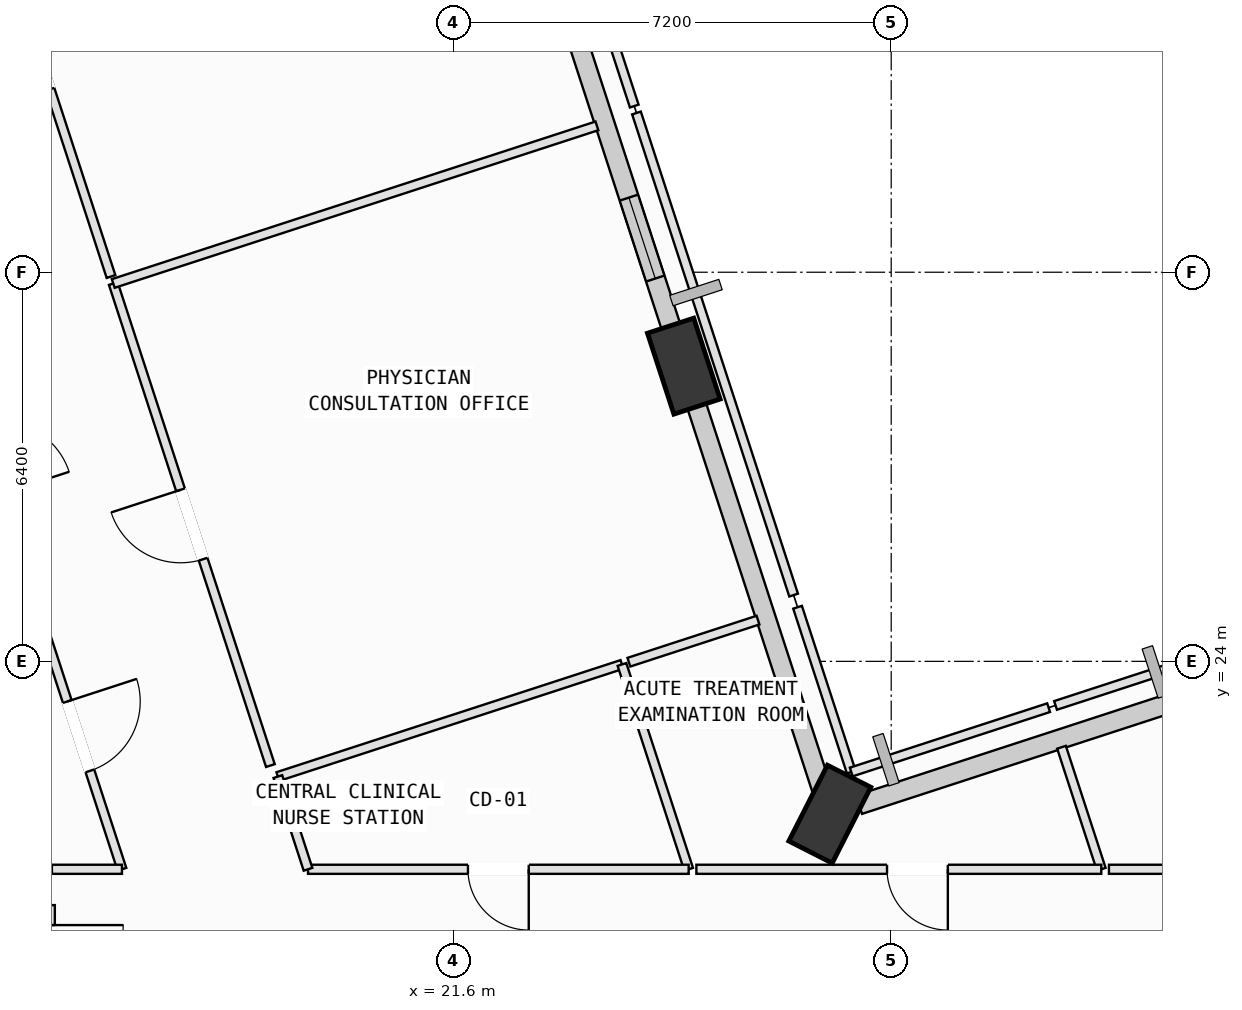
"""IFC4 building model, lengths in metres.
Left out: names, types, materials, properties, quantities, classifications, styles, units other than length and angle.
Written with IfcOpenShell. Run it as: python <this file> out.ifc"""

import sys

from ifc_helpers import new_model, si_unit, direction, frame, frame_2d, origin, origin_2d, place, context, subcontext, project, spatial, rectangle, extrude, element, fill, save


model = new_model("IFC4")
c1 = context("Model", 3, precision=1e-05, world=origin(), true_north=direction((0.0, 1.0)))
c2 = subcontext(c1, "Body", "Model", "MODEL_VIEW")
j1 = project(units=[si_unit("LENGTHUNIT", "METRE"), si_unit("PLANEANGLEUNIT", "RADIAN")], contexts=[c1])
p1 = place(None, origin())
s1 = spatial("IfcSite", under=j1, at=p1, CompositionType="ELEMENT")
p2 = place(p1, origin())
s2 = spatial("IfcBuilding", under=s1, at=p2, CompositionType="ELEMENT")
p3 = place(p2, frame((0.0, 0.0, 100.4)))
s3 = spatial("IfcBuildingStorey", under=s2, at=p3, CompositionType="ELEMENT", Elevation=100.4)
p4 = place(p3, frame((27.791, 21.487, 0.002), z_axis=(0.013923425681, -0.023938521346, 0.999616469159), x_axis=(-0.056236528656, 0.998112250156, 0.0246858043)))
e1 = element("IfcColumn", 1, at=p4, inside=s3, PredefinedType="COLUMN", context=c2, shape_type="SweptSolid", body=[
    extrude(rectangle(XDim=1.4, YDim=0.8, at=origin_2d()), origin(), (0.0, 0.0, 1.0), 3.998),
])
p5 = place(p3, frame((25.389, 28.855, 0.002), z_axis=(-0.016543774751, -0.034125350869, 0.999280623221), x_axis=(0.135656548202, 0.99009956207, 0.036057705404)))
e2 = element("IfcColumn", 2, at=p5, inside=s3, PredefinedType="COLUMN", context=c2, shape_type="SweptSolid", body=[
    extrude(rectangle(XDim=1.4, YDim=0.8, at=origin_2d()), origin(), (0.0, 0.0, 1.0), 3.999),
])
p6 = place(p3, frame((28.271, 21.643, 0.0), z_axis=(0.0, 0.0, 1.0), x_axis=(0.950787828702, 0.309842709763, 0.0)))
e3 = element("IfcWall", 3, at=p6, inside=s3, PredefinedType="SOLIDWALL", context=c2, shape_type="SweptSolid", body=[
    extrude(rectangle(XDim=5.96, YDim=0.32, at=frame_2d((2.98, 0.0))), origin(), (0.0, 0.0, 1.0), 3.165),
])
p7 = place(p3, frame((25.559, 28.334, 0.0), z_axis=(0.0, 0.0, 1.0), x_axis=(0.30987156724, -0.950778424143, 0.0)))
e4 = element("IfcWall", 4, at=p7, inside=s3, PredefinedType="SOLIDWALL", context=c2, shape_type="SweptSolid", body=[
    extrude(rectangle(XDim=6.76, YDim=0.32, at=frame_2d((3.38, 0.0))), origin(), (0.0, 0.0, 1.0), 2.965),
])
p8 = place(p3, frame((23.325, 35.189, 0.0), z_axis=(0.0, 0.0, 1.0), x_axis=(0.309864869001, -0.950780607164, 0.0)))
e5 = element("IfcWall", 5, at=p8, inside=s3, PredefinedType="SOLIDWALL", context=c2, shape_type="SweptSolid", body=[
    extrude(rectangle(XDim=6.223, YDim=0.32, at=frame_2d((3.111, 0.0))), origin(), (0.0, 0.0, 1.0), 3.165),
])
p9 = place(p8, frame((3.746, 0.0, 0.75)))
e6 = element("IfcOpeningElement", 6, at=p9, cuts=e5, PredefinedType="OPENING", context=c2, shape_type="SweptSolid", body=[
    extrude(rectangle(XDim=1.4, YDim=1.85, at=frame_2d((0.7, 0.925))), frame((0.0, 0.17, 0.0), z_axis=(0.0, -1.0, 0.0), x_axis=(1.0, 0.0, 0.0)), (0.0, 0.0, 1.0), 0.34),
])
p10 = place(p3, frame((14.97, 19.991, 0.0), z_axis=(0.0, 0.0, 1.0), x_axis=(0.0, -1.0, 0.0)))
e7 = element("IfcWall", 7, at=p10, inside=s3, PredefinedType="PARTITIONING", context=c2, shape_type="SweptSolid", body=[
    extrude(rectangle(XDim=1.761, YDim=0.15, at=frame_2d((0.88, 0.0))), origin(), (0.0, 0.0, 1.0), 3.78),
])
p11 = place(p10, frame((0.329, 0.0, 0.0)))
e8 = element("IfcOpeningElement", 8, at=p11, cuts=e7, PredefinedType="OPENING", context=c2, shape_type="SweptSolid", body=[
    extrude(rectangle(XDim=1.2, YDim=2.15, at=frame_2d((0.6, 1.075))), frame((0.0, 0.085, 0.0), z_axis=(0.0, -1.0, 0.0), x_axis=(1.0, 0.0, 0.0)), (0.0, 0.0, 1.0), 0.17),
])
p12 = place(p3, frame((14.722, 24.958, 0.0), z_axis=(0.0, 0.0, 1.0), x_axis=(0.309905994954, -0.950767202995, 0.0)))
e9 = element("IfcWall", 9, at=p12, inside=s3, PredefinedType="PARTITIONING", context=c2, shape_type="SweptSolid", body=[
    extrude(rectangle(XDim=4.605, YDim=0.15, at=frame_2d((2.302, 0.0))), origin(), (0.0, 0.0, 1.0), 3.78),
])
p13 = place(p12, frame((1.702, 0.0, 0.0)))
e10 = element("IfcOpeningElement", 10, at=p13, cuts=e9, PredefinedType="OPENING", context=c2, shape_type="SweptSolid", body=[
    extrude(rectangle(XDim=1.2, YDim=2.15, at=frame_2d((0.6, 1.075))), frame((0.0, 0.085, 0.0), z_axis=(0.0, -1.0, 0.0), x_axis=(1.0, 0.0, 0.0)), (0.0, 0.0, 1.0), 0.17),
])
p14 = place(p3, frame((16.149, 20.58, 0.0), z_axis=(0.0, 0.0, 1.0), x_axis=(-1.0, 0.0, 0.0)))
e11 = element("IfcWall", 11, at=p14, inside=s3, PredefinedType="PARTITIONING", context=c2, shape_type="SweptSolid", body=[
    extrude(rectangle(XDim=1.152, YDim=0.15, at=frame_2d((0.576, 0.0))), origin(), (0.0, 0.0, 1.0), 3.78),
])
p15 = place(p3, frame((18.713, 22.105, 0.0), z_axis=(0.0, 0.0, 1.0), x_axis=(0.950798675911, 0.309809421879, 0.0)))
e12 = element("IfcWall", 12, at=p15, inside=s3, PredefinedType="PARTITIONING", context=c2, shape_type="SweptSolid", body=[
    extrude(rectangle(XDim=5.952, YDim=0.15, at=frame_2d((2.976, 0.0))), origin(), (0.0, 0.0, 1.0), 3.78),
])
p16 = place(p3, frame((24.372, 23.949, 0.0), z_axis=(0.0, 0.0, 1.0), x_axis=(0.309604883452, -0.950865298632, 0.0)))
e13 = element("IfcWall", 13, at=p16, inside=s3, PredefinedType="PARTITIONING", context=c2, shape_type="SweptSolid", body=[
    extrude(rectangle(XDim=3.543, YDim=0.15, at=frame_2d((1.771, 0.0))), origin(), (0.0, 0.0, 1.0), 2.965),
])
p17 = place(p3, frame((25.469, 20.58, 0.0), z_axis=(0.0, 0.0, 1.0), x_axis=(-1.0, 0.0, 0.0)))
e14 = element("IfcWall", 14, at=p17, inside=s3, PredefinedType="PARTITIONING", context=c2, shape_type="SweptSolid", body=[
    extrude(rectangle(XDim=6.26, YDim=0.15, at=frame_2d((3.13, 0.0))), origin(), (0.0, 0.0, 1.0), 3.78),
])
p18 = place(p17, frame((2.63, 0.0, 0.0)))
e15 = element("IfcOpeningElement", 15, at=p18, cuts=e14, PredefinedType="OPENING", context=c2, shape_type="SweptSolid", body=[
    extrude(rectangle(XDim=1.0, YDim=2.12, at=frame_2d((0.5, 1.06))), frame((0.0, 0.085, 0.0), z_axis=(0.0, -1.0, 0.0), x_axis=(1.0, 0.0, 0.0)), (0.0, 0.0, 1.0), 0.17),
])
p19 = place(p3, frame((19.209, 20.58, 0.0), z_axis=(0.0, 0.0, 1.0), x_axis=(-0.309368350473, 0.950942282016, 0.0)))
e16 = element("IfcWall", 16, at=p19, inside=s3, PredefinedType="PARTITIONING", context=c2, shape_type="SweptSolid", body=[
    extrude(rectangle(XDim=1.604, YDim=0.15, at=frame_2d((0.802, 0.0))), origin(), (0.0, 0.0, 1.0), 3.78),
])
p20 = place(p3, frame((24.486, 23.986, 0.0), z_axis=(0.0, 0.0, 1.0), x_axis=(0.950772569681, 0.3098895299, 0.0)))
e17 = element("IfcWall", 17, at=p20, inside=s3, PredefinedType="PARTITIONING", context=c2, shape_type="SweptSolid", body=[
    extrude(rectangle(XDim=2.233, YDim=0.15, at=frame_2d((1.116, 0.0))), origin(), (0.0, 0.0, 1.0), 3.78),
])
p21 = place(p3, frame((27.26, 24.89, 0.0), z_axis=(0.0, 0.0, 1.0), x_axis=(0.309821982593, -0.950794583021, 0.0)))
e18 = element("IfcWall", 18, at=p21, inside=s3, PredefinedType="PARTITIONING", context=c2, shape_type="SweptSolid", body=[
    extrude(rectangle(XDim=2.85, YDim=0.15, at=frame_2d((1.425, 0.0))), origin(), (0.0, 0.0, 1.0), 3.78),
])
p22 = place(p3, frame((28.143, 22.18, 0.0), z_axis=(0.0, 0.0, 1.0), x_axis=(0.950757786867, 0.309934881405, 0.0)))
e19 = element("IfcWall", 19, at=p22, inside=s3, PredefinedType="PARTITIONING", context=c2, shape_type="SweptSolid", body=[
    extrude(rectangle(XDim=3.414, YDim=0.15, at=frame_2d((1.707, 0.0))), origin(), (0.0, 0.0, 1.0), 3.78),
])
p23 = place(p3, frame((31.601, 22.587, 0.0), z_axis=(0.0, 0.0, 1.0), x_axis=(0.309766024329, -0.950812815528, 0.0)))
e20 = element("IfcWall", 20, at=p23, inside=s3, PredefinedType="PARTITIONING", context=c2, shape_type="SweptSolid", body=[
    extrude(rectangle(XDim=2.111, YDim=0.15, at=frame_2d((1.055, 0.0))), origin(), (0.0, 0.0, 1.0), 3.78),
])
p24 = place(p3, frame((32.255, 20.58, 0.0), z_axis=(0.0, 0.0, 1.0), x_axis=(-1.0, 0.0, 0.0)))
e21 = element("IfcWall", 21, at=p24, inside=s3, PredefinedType="PARTITIONING", context=c2, shape_type="SweptSolid", body=[
    extrude(rectangle(XDim=6.659, YDim=0.15, at=frame_2d((3.33, 0.0))), origin(), (0.0, 0.0, 1.0), 3.78),
])
p25 = place(p24, frame((2.524, 0.0, 0.0)))
e22 = element("IfcOpeningElement", 22, at=p25, cuts=e21, PredefinedType="OPENING", context=c2, shape_type="SweptSolid", body=[
    extrude(rectangle(XDim=1.0, YDim=2.12, at=frame_2d((0.5, 1.06))), frame((0.0, 0.085, 0.0), z_axis=(0.0, -1.0, 0.0), x_axis=(1.0, 0.0, 0.0)), (0.0, 0.0, 1.0), 0.17),
])
p26 = place(p3, frame((38.611, 20.58, 0.0), z_axis=(0.0, 0.0, 1.0), x_axis=(-1.0, 0.0, 0.0)))
e23 = element("IfcWall", 23, at=p26, inside=s3, PredefinedType="PARTITIONING", context=c2, shape_type="SweptSolid", body=[
    extrude(rectangle(XDim=6.23, YDim=0.15, at=frame_2d((3.115, 0.0))), origin(), (0.0, 0.0, 1.0), 3.365),
])
p27 = place(p26, frame((3.143, 0.0, 0.0)))
e24 = element("IfcOpeningElement", 24, at=p27, cuts=e23, PredefinedType="OPENING", context=c2, shape_type="SweptSolid", body=[
    extrude(rectangle(XDim=1.2, YDim=2.15, at=frame_2d((0.6, 1.075))), frame((0.0, 0.085, 0.0), z_axis=(0.0, -1.0, 0.0), x_axis=(1.0, 0.0, 0.0)), (0.0, 0.0, 1.0), 0.17),
])
p28 = place(p3, frame((31.503, 23.275, 0.0), z_axis=(0.0, 0.0, 1.0), x_axis=(0.950751552186, 0.30995400629, 0.0)))
e25 = element("IfcWall", 25, at=p28, inside=s3, PredefinedType="PARTITIONING", context=c2, shape_type="SweptSolid", body=[
    extrude(rectangle(XDim=4.394, YDim=0.15, at=frame_2d((2.197, 0.0))), origin(), (0.0, 0.0, 1.0), 3.78),
])
p29 = place(p3, frame((18.59, 22.286, 0.0), z_axis=(0.0, 0.0, 1.0), x_axis=(-0.30984457051, 0.950787222319, 0.0)))
e26 = element("IfcWall", 26, at=p29, inside=s3, PredefinedType="PARTITIONING", context=c2, shape_type="SweptSolid", body=[
    extrude(rectangle(XDim=8.34, YDim=0.15, at=frame_2d((4.17, 0.0))), origin(), (0.0, 0.0, 1.0), 3.78),
])
p30 = place(p29, frame((3.57, 0.0, 0.0)))
e27 = element("IfcOpeningElement", 27, at=p30, cuts=e26, PredefinedType="OPENING", context=c2, shape_type="SweptSolid", body=[
    extrude(rectangle(XDim=1.2, YDim=2.15, at=frame_2d((0.6, 1.075))), frame((0.0, 0.085, 0.0), z_axis=(0.0, -1.0, 0.0), x_axis=(1.0, 0.0, 0.0)), (0.0, 0.0, 1.0), 0.17),
])
p31 = place(p3, frame((16.006, 30.215, 0.0), z_axis=(0.0, 0.0, 1.0), x_axis=(0.950795081027, 0.309820454286, 0.0)))
e28 = element("IfcWall", 28, at=p31, inside=s3, PredefinedType="PARTITIONING", context=c2, shape_type="SweptSolid", body=[
    extrude(rectangle(XDim=8.365, YDim=0.15, at=frame_2d((4.183, 0.0))), origin(), (0.0, 0.0, 1.0), 3.78),
])
p32 = place(p3, frame((24.611, 33.019, 0.0), z_axis=(0.0, 0.0, 1.0), x_axis=(0.309853194986, -0.950784411713, 0.0)))
e29 = element("IfcWall", 29, at=p32, inside=s3, PredefinedType="PARTITIONING", context=c2, shape_type="SweptSolid", body=[
    extrude(rectangle(XDim=8.339, YDim=0.15, at=frame_2d((4.17, 0.0))), origin(), (0.0, 0.0, 1.0), 3.78),
])
p33 = place(p3, frame((15.969, 30.329, 0.0), z_axis=(0.0, 0.0, 1.0), x_axis=(-0.309856581724, 0.950783307995, 0.0)))
e30 = element("IfcWall", 30, at=p33, inside=s3, PredefinedType="PARTITIONING", context=c2, shape_type="SweptSolid", body=[
    extrude(rectangle(XDim=7.4, YDim=0.15, at=frame_2d((3.7, 0.0))), origin(), (0.0, 0.0, 1.0), 3.78),
])
p34 = place(p33, frame((3.24, 0.0, 0.0)))
e31 = element("IfcOpeningElement", 31, at=p34, cuts=e30, PredefinedType="OPENING", context=c2, shape_type="SweptSolid", body=[
    extrude(rectangle(XDim=0.92, YDim=2.1, at=frame_2d((0.46, 1.05))), frame((0.0, 0.085, 0.0), z_axis=(0.0, -1.0, 0.0), x_axis=(1.0, 0.0, 0.0)), (0.0, 0.0, 1.0), 0.17),
])
p35 = place(p3, frame((22.281, 40.169, 0.0), z_axis=(0.0, 0.0, 1.0), x_axis=(0.309856581724, -0.950783307995, 0.0)))
e32 = element("IfcWall", 32, at=p35, inside=s3, PredefinedType="PARTITIONING", context=c2, shape_type="SweptSolid", body=[
    extrude(rectangle(XDim=7.4, YDim=0.15, at=frame_2d((3.7, 0.0))), origin(), (0.0, 0.0, 1.0), 3.78),
])
p36 = place(p9, origin())
e33 = element("IfcWindow", 33, at=p36, inside=s3, PartitioningType="SINGLE_PANEL", PredefinedType="WINDOW", context=c2, shape_type="SweptSolid", body=[
    extrude(rectangle(XDim=1.4, YDim=1.85, at=frame_2d((0.7, 0.925))), frame((0.0, 0.03, 0.0), z_axis=(0.0, -1.0, 0.0), x_axis=(1.0, 0.0, 0.0)), (0.0, 0.0, 1.0), 0.06),
])
fill(e6, e33)
p37 = place(p13, origin())
e34 = element("IfcDoor", 34, at=p37, inside=s3, OperationType="SINGLE_SWING_LEFT", PredefinedType="DOOR", context=c2, shape_type="SweptSolid", body=[
    extrude(rectangle(XDim=1.2, YDim=2.15, at=frame_2d((0.6, 1.075))), frame((0.0, 0.025, 0.0), z_axis=(0.0, -1.0, 0.0), x_axis=(1.0, 0.0, 0.0)), (0.0, 0.0, 1.0), 0.05),
])
fill(e10, e34)
p38 = place(p18, origin())
e35 = element("IfcDoor", 35, at=p38, inside=s3, OperationType="SINGLE_SWING_LEFT", PredefinedType="DOOR", context=c2, shape_type="SweptSolid", body=[
    extrude(rectangle(XDim=1.0, YDim=2.12, at=frame_2d((0.5, 1.06))), frame((0.0, 0.025, 0.0), z_axis=(0.0, -1.0, 0.0), x_axis=(1.0, 0.0, 0.0)), (0.0, 0.0, 1.0), 0.05),
])
fill(e15, e35)
p39 = place(p25, origin())
e36 = element("IfcDoor", 36, at=p39, inside=s3, OperationType="SINGLE_SWING_LEFT", PredefinedType="DOOR", context=c2, shape_type="SweptSolid", body=[
    extrude(rectangle(XDim=1.0, YDim=2.12, at=frame_2d((0.5, 1.06))), frame((0.0, 0.025, 0.0), z_axis=(0.0, -1.0, 0.0), x_axis=(1.0, 0.0, 0.0)), (0.0, 0.0, 1.0), 0.05),
])
fill(e22, e36)
p40 = place(p30, origin())
e37 = element("IfcDoor", 37, at=p40, inside=s3, OperationType="SINGLE_SWING_RIGHT", PredefinedType="DOOR", context=c2, shape_type="SweptSolid", body=[
    extrude(rectangle(XDim=1.2, YDim=2.15, at=frame_2d((0.6, 1.075))), frame((0.0, 0.025, 0.0), z_axis=(0.0, -1.0, 0.0), x_axis=(1.0, 0.0, 0.0)), (0.0, 0.0, 1.0), 0.05),
])
fill(e27, e37)
save(model, sys.argv[1])
